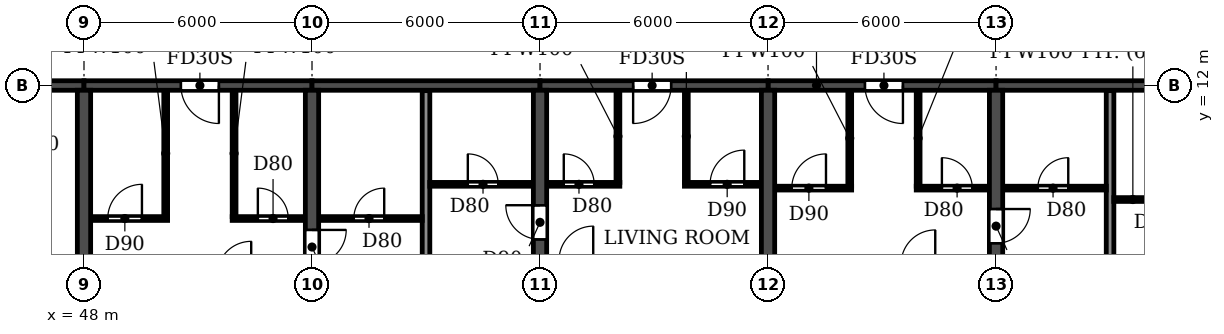
"""IFC4 building model, lengths in metres.
Left out: names, types, materials, properties, quantities, classifications, styles, units other than length and angle.
Written with IfcOpenShell. Run it as: python <this file> out.ifc"""

import sys

from ifc_helpers import new_model, si_unit, direction, frame, frame_2d, origin, place, context, subcontext, project, spatial, rectangle, extrude, element, fill, save


model = new_model("IFC4")
c1 = context("Model", 3, precision=1e-05, world=origin(), true_north=direction((0.0, 1.0)))
c2 = subcontext(c1, "Body", "Model", "MODEL_VIEW")
j1 = project(units=[si_unit("LENGTHUNIT", "METRE"), si_unit("PLANEANGLEUNIT", "RADIAN")], contexts=[c1])
p1 = place(None, origin())
s1 = spatial("IfcSite", under=j1, at=p1, CompositionType="ELEMENT")
p2 = place(p1, origin())
s2 = spatial("IfcBuilding", under=s1, at=p2, CompositionType="ELEMENT")
p3 = place(p2, frame((0.0, 0.0, 112.5)))
s3 = spatial("IfcBuildingStorey", under=s2, at=p3, CompositionType="ELEMENT", Elevation=112.5)
p4 = place(p3, frame((48.0, 0.2, 0.0), z_axis=(0.0, 0.0, 1.0), x_axis=(0.0, 1.0, 0.0)))
e1 = element("IfcWall", 1, at=p4, inside=s3, PredefinedType="SHEAR", context=c2, shape_type="SweptSolid", body=[
    extrude(rectangle(XDim=11.675, YDim=0.35, at=frame_2d((5.837, 0.0))), origin(), (0.0, 0.0, 1.0), 2.95),
])
p5 = place(p3, frame((54.0, 0.2, 0.0), z_axis=(0.0, 0.0, 1.0), x_axis=(0.0, 1.0, 0.0)))
e2 = element("IfcWall", 2, at=p5, inside=s3, PredefinedType="SHEAR", context=c2, shape_type="SweptSolid", body=[
    extrude(rectangle(XDim=11.675, YDim=0.35, at=frame_2d((5.837, 0.0))), origin(), (0.0, 0.0, 1.0), 2.95),
])
p6 = place(p5, frame((7.1, 0.0, 0.0)))
e3 = element("IfcOpeningElement", 3, at=p6, cuts=e2, PredefinedType="OPENING", context=c2, shape_type="SweptSolid", body=[
    extrude(rectangle(XDim=0.9, YDim=2.1, at=frame_2d((0.45, 1.05))), frame((0.0, 0.185, 0.0), z_axis=(0.0, -1.0, 0.0), x_axis=(1.0, 0.0, 0.0)), (0.0, 0.0, 1.0), 0.37),
])
p7 = place(p3, frame((60.0, 0.2, 0.0), z_axis=(0.0, 0.0, 1.0), x_axis=(0.0, 1.0, 0.0)))
e4 = element("IfcWall", 4, at=p7, inside=s3, PredefinedType="SHEAR", context=c2, shape_type="SweptSolid", body=[
    extrude(rectangle(XDim=11.675, YDim=0.35, at=frame_2d((5.837, 0.0))), origin(), (0.0, 0.0, 1.0), 2.95),
])
p8 = place(p7, frame((7.75, 0.0, 0.0)))
e5 = element("IfcOpeningElement", 5, at=p8, cuts=e4, PredefinedType="OPENING", context=c2, shape_type="SweptSolid", body=[
    extrude(rectangle(XDim=0.9, YDim=2.1, at=frame_2d((0.45, 1.05))), frame((0.0, 0.185, 0.0), z_axis=(0.0, -1.0, 0.0), x_axis=(1.0, 0.0, 0.0)), (0.0, 0.0, 1.0), 0.37),
])
p9 = place(p3, frame((66.0, 0.2, 0.0), z_axis=(0.0, 0.0, 1.0), x_axis=(0.0, 1.0, 0.0)))
e6 = element("IfcWall", 6, at=p9, inside=s3, PredefinedType="SHEAR", context=c2, shape_type="SweptSolid", body=[
    extrude(rectangle(XDim=11.675, YDim=0.35, at=frame_2d((5.837, 0.0))), origin(), (0.0, 0.0, 1.0), 2.95),
])
p10 = place(p3, frame((72.0, 0.2, 0.0), z_axis=(0.0, 0.0, 1.0), x_axis=(0.0, 1.0, 0.0)))
e7 = element("IfcWall", 7, at=p10, inside=s3, PredefinedType="SHEAR", context=c2, shape_type="SweptSolid", body=[
    extrude(rectangle(XDim=11.675, YDim=0.35, at=frame_2d((5.837, 0.0))), origin(), (0.0, 0.0, 1.0), 2.95),
])
p11 = place(p10, frame((7.65, 0.0, 0.0)))
e8 = element("IfcOpeningElement", 8, at=p11, cuts=e7, PredefinedType="OPENING", context=c2, shape_type="SweptSolid", body=[
    extrude(rectangle(XDim=0.9, YDim=2.1, at=frame_2d((0.45, 1.05))), frame((0.0, 0.185, 0.0), z_axis=(0.0, -1.0, 0.0), x_axis=(1.0, 0.0, 0.0)), (0.0, 0.0, 1.0), 0.37),
])
p12 = place(p3, frame((42.0, 12.0, 0.0), z_axis=(0.0, 0.0, 1.0), x_axis=(1.0, 0.0, 0.0)))
e9 = element("IfcWall", 9, at=p12, inside=s3, PredefinedType="SHEAR", context=c2, shape_type="SweptSolid", body=[
    extrude(rectangle(XDim=6.0, YDim=0.25, at=frame_2d((3.0, 0.0))), origin(), (0.0, 0.0, 1.0), 2.35),
])
p13 = place(p12, frame((2.45, 0.0, 0.0)))
e10 = element("IfcOpeningElement", 10, at=p13, cuts=e9, PredefinedType="OPENING", context=c2, shape_type="SweptSolid", body=[
    extrude(rectangle(XDim=1.0, YDim=2.1, at=frame_2d((0.5, 1.05))), frame((0.0, 0.135, 0.0), z_axis=(0.0, -1.0, 0.0), x_axis=(1.0, 0.0, 0.0)), (0.0, 0.0, 1.0), 0.27),
])
p14 = place(p3, frame((48.0, 12.0, 0.0), z_axis=(0.0, 0.0, 1.0), x_axis=(1.0, 0.0, 0.0)))
e11 = element("IfcWall", 11, at=p14, inside=s3, PredefinedType="SHEAR", context=c2, shape_type="SweptSolid", body=[
    extrude(rectangle(XDim=6.0, YDim=0.25, at=frame_2d((3.0, 0.0))), origin(), (0.0, 0.0, 1.0), 2.35),
])
p15 = place(p14, frame((2.55, 0.0, 0.0)))
e12 = element("IfcOpeningElement", 12, at=p15, cuts=e11, PredefinedType="OPENING", context=c2, shape_type="SweptSolid", body=[
    extrude(rectangle(XDim=1.0, YDim=2.1, at=frame_2d((0.5, 1.05))), frame((0.0, 0.135, 0.0), z_axis=(0.0, -1.0, 0.0), x_axis=(1.0, 0.0, 0.0)), (0.0, 0.0, 1.0), 0.27),
])
p16 = place(p3, frame((54.0, 12.0, 0.0), z_axis=(0.0, 0.0, 1.0), x_axis=(1.0, 0.0, 0.0)))
e13 = element("IfcWall", 13, at=p16, inside=s3, PredefinedType="SHEAR", context=c2, shape_type="SweptSolid", body=[
    extrude(rectangle(XDim=6.0, YDim=0.25, at=frame_2d((3.0, 0.0))), origin(), (0.0, 0.0, 1.0), 2.35),
])
p17 = place(p3, frame((60.0, 12.0, 0.0), z_axis=(0.0, 0.0, 1.0), x_axis=(1.0, 0.0, 0.0)))
e14 = element("IfcWall", 14, at=p17, inside=s3, PredefinedType="SHEAR", context=c2, shape_type="SweptSolid", body=[
    extrude(rectangle(XDim=6.0, YDim=0.25, at=frame_2d((3.0, 0.0))), origin(), (0.0, 0.0, 1.0), 2.35),
])
p18 = place(p17, frame((2.45, 0.0, 0.0)))
e15 = element("IfcOpeningElement", 15, at=p18, cuts=e14, PredefinedType="OPENING", context=c2, shape_type="SweptSolid", body=[
    extrude(rectangle(XDim=1.0, YDim=2.1, at=frame_2d((0.5, 1.05))), frame((0.0, 0.135, 0.0), z_axis=(0.0, -1.0, 0.0), x_axis=(1.0, 0.0, 0.0)), (0.0, 0.0, 1.0), 0.27),
])
p19 = place(p3, frame((66.0, 12.0, 0.0), z_axis=(0.0, 0.0, 1.0), x_axis=(1.0, 0.0, 0.0)))
e16 = element("IfcWall", 16, at=p19, inside=s3, PredefinedType="SHEAR", context=c2, shape_type="SweptSolid", body=[
    extrude(rectangle(XDim=6.0, YDim=0.25, at=frame_2d((3.0, 0.0))), origin(), (0.0, 0.0, 1.0), 2.35),
])
p20 = place(p19, frame((2.55, 0.0, 0.0)))
e17 = element("IfcOpeningElement", 17, at=p20, cuts=e16, PredefinedType="OPENING", context=c2, shape_type="SweptSolid", body=[
    extrude(rectangle(XDim=1.0, YDim=2.1, at=frame_2d((0.5, 1.05))), frame((0.0, 0.135, 0.0), z_axis=(0.0, -1.0, 0.0), x_axis=(1.0, 0.0, 0.0)), (0.0, 0.0, 1.0), 0.27),
])
p21 = place(p3, frame((72.0, 12.0, 0.0), z_axis=(0.0, 0.0, 1.0), x_axis=(1.0, 0.0, 0.0)))
e18 = element("IfcWall", 18, at=p21, inside=s3, PredefinedType="SHEAR", context=c2, shape_type="SweptSolid", body=[
    extrude(rectangle(XDim=6.0, YDim=0.25, at=frame_2d((3.0, 0.0))), origin(), (0.0, 0.0, 1.0), 2.35),
])
for number, where, z_axis, x_axis in (
    (19, (57.0, 0.06, 0.0), (0.0, 0.0, 1.0), (0.0, 1.0, 0.0)),
    (20, (75.0, 0.06, 0.0), (0.0, 0.0, 1.0), (0.0, 1.0, 0.0)),
):
    element("IfcWall", number, at=place(p3, frame(where, z_axis=z_axis, x_axis=x_axis)), inside=s3, PredefinedType="PARTITIONING", context=c2, shape_type="SweptSolid", body=[
        extrude(rectangle(XDim=11.805, YDim=0.2, at=frame_2d((5.902, 0.0))), origin(), (0.0, 0.0, 1.0), 2.95),
    ])
p22 = place(p3, frame((48.185, 8.5, 0.0), z_axis=(0.0, 0.0, 1.0), x_axis=(1.0, 0.0, 0.0)))
e21 = element("IfcWall", 21, at=p22, inside=s3, PredefinedType="PARTITIONING", context=c2, shape_type="SweptSolid", body=[
    extrude(rectangle(XDim=2.015, YDim=0.1, at=frame_2d((1.007, 0.0))), origin(), (0.0, 0.0, 1.0), 2.95),
])
p23 = place(p22, frame((0.44, 0.0, 0.0)))
e22 = element("IfcOpeningElement", 22, at=p23, cuts=e21, PredefinedType="OPENING", context=c2, shape_type="SweptSolid", body=[
    extrude(rectangle(XDim=0.9, YDim=2.1, at=frame_2d((0.45, 1.05))), frame((0.0, 0.06, 0.0), z_axis=(0.0, -1.0, 0.0), x_axis=(1.0, 0.0, 0.0)), (0.0, 0.0, 1.0), 0.12),
])
p24 = place(p3, frame((51.9, 8.5, 0.0), z_axis=(0.0, 0.0, 1.0), x_axis=(1.0, 0.0, 0.0)))
e23 = element("IfcWall", 23, at=p24, inside=s3, PredefinedType="PARTITIONING", context=c2, shape_type="SweptSolid", body=[
    extrude(rectangle(XDim=1.915, YDim=0.1, at=frame_2d((0.958, 0.0))), origin(), (0.0, 0.0, 1.0), 2.95),
])
p25 = place(p24, frame((0.675, 0.0, 0.0)))
e24 = element("IfcOpeningElement", 24, at=p25, cuts=e23, PredefinedType="OPENING", context=c2, shape_type="SweptSolid", body=[
    extrude(rectangle(XDim=0.8, YDim=2.1, at=frame_2d((0.4, 1.05))), frame((0.0, 0.06, 0.0), z_axis=(0.0, -1.0, 0.0), x_axis=(1.0, 0.0, 0.0)), (0.0, 0.0, 1.0), 0.12),
])
p26 = place(p3, frame((54.185, 8.5, 0.0), z_axis=(0.0, 0.0, 1.0), x_axis=(1.0, 0.0, 0.0)))
e25 = element("IfcWall", 25, at=p26, inside=s3, PredefinedType="PARTITIONING", context=c2, shape_type="SweptSolid", body=[
    extrude(rectangle(XDim=2.715, YDim=0.1, at=frame_2d((1.357, 0.0))), origin(), (0.0, 0.0, 1.0), 2.95),
])
p27 = place(p26, frame((0.915, 0.0, 0.0)))
e26 = element("IfcOpeningElement", 26, at=p27, cuts=e25, PredefinedType="OPENING", context=c2, shape_type="SweptSolid", body=[
    extrude(rectangle(XDim=0.8, YDim=2.1, at=frame_2d((0.4, 1.05))), frame((0.0, 0.06, 0.0), z_axis=(0.0, -1.0, 0.0), x_axis=(1.0, 0.0, 0.0)), (0.0, 0.0, 1.0), 0.12),
])
p28 = place(p3, frame((75.1, 9.0, 0.0), z_axis=(0.0, 0.0, 1.0), x_axis=(1.0, 0.0, 0.0)))
e27 = element("IfcWall", 27, at=p28, inside=s3, PredefinedType="PARTITIONING", context=c2, shape_type="SweptSolid", body=[
    extrude(rectangle(XDim=2.715, YDim=0.1, at=frame_2d((1.357, 0.0))), origin(), (0.0, 0.0, 1.0), 2.95),
])
p29 = place(p28, frame((1.0, 0.0, 0.0)))
e28 = element("IfcOpeningElement", 28, at=p29, cuts=e27, PredefinedType="OPENING", context=c2, shape_type="SweptSolid", body=[
    extrude(rectangle(XDim=0.8, YDim=2.1, at=frame_2d((0.4, 1.05))), frame((0.0, 0.06, 0.0), z_axis=(0.0, -1.0, 0.0), x_axis=(1.0, 0.0, 0.0)), (0.0, 0.0, 1.0), 0.12),
])
p30 = place(p3, frame((66.185, 9.3, 0.0), z_axis=(0.0, 0.0, 1.0), x_axis=(1.0, 0.0, 0.0)))
e29 = element("IfcWall", 29, at=p30, inside=s3, PredefinedType="PARTITIONING", context=c2, shape_type="SweptSolid", body=[
    extrude(rectangle(XDim=2.015, YDim=0.1, at=frame_2d((1.007, 0.0))), origin(), (0.0, 0.0, 1.0), 2.95),
])
p31 = place(p30, frame((0.44, 0.0, 0.0)))
e30 = element("IfcOpeningElement", 30, at=p31, cuts=e29, PredefinedType="OPENING", context=c2, shape_type="SweptSolid", body=[
    extrude(rectangle(XDim=0.9, YDim=2.1, at=frame_2d((0.45, 1.05))), frame((0.0, 0.06, 0.0), z_axis=(0.0, -1.0, 0.0), x_axis=(1.0, 0.0, 0.0)), (0.0, 0.0, 1.0), 0.12),
])
p32 = place(p3, frame((69.9, 9.3, 0.0), z_axis=(0.0, 0.0, 1.0), x_axis=(1.0, 0.0, 0.0)))
e31 = element("IfcWall", 31, at=p32, inside=s3, PredefinedType="PARTITIONING", context=c2, shape_type="SweptSolid", body=[
    extrude(rectangle(XDim=1.915, YDim=0.1, at=frame_2d((0.958, 0.0))), origin(), (0.0, 0.0, 1.0), 2.95),
])
p33 = place(p32, frame((0.675, 0.0, 0.0)))
e32 = element("IfcOpeningElement", 32, at=p33, cuts=e31, PredefinedType="OPENING", context=c2, shape_type="SweptSolid", body=[
    extrude(rectangle(XDim=0.8, YDim=2.1, at=frame_2d((0.4, 1.05))), frame((0.0, 0.06, 0.0), z_axis=(0.0, -1.0, 0.0), x_axis=(1.0, 0.0, 0.0)), (0.0, 0.0, 1.0), 0.12),
])
p34 = place(p3, frame((72.185, 9.3, 0.0), z_axis=(0.0, 0.0, 1.0), x_axis=(1.0, 0.0, 0.0)))
e33 = element("IfcWall", 33, at=p34, inside=s3, PredefinedType="PARTITIONING", context=c2, shape_type="SweptSolid", body=[
    extrude(rectangle(XDim=2.715, YDim=0.1, at=frame_2d((1.357, 0.0))), origin(), (0.0, 0.0, 1.0), 2.95),
])
p35 = place(p34, frame((0.915, 0.0, 0.0)))
e34 = element("IfcOpeningElement", 34, at=p35, cuts=e33, PredefinedType="OPENING", context=c2, shape_type="SweptSolid", body=[
    extrude(rectangle(XDim=0.8, YDim=2.1, at=frame_2d((0.4, 1.05))), frame((0.0, 0.06, 0.0), z_axis=(0.0, -1.0, 0.0), x_axis=(1.0, 0.0, 0.0)), (0.0, 0.0, 1.0), 0.12),
])
p36 = place(p3, frame((57.1, 9.4, 0.0), z_axis=(0.0, 0.0, 1.0), x_axis=(1.0, 0.0, 0.0)))
e35 = element("IfcWall", 35, at=p36, inside=s3, PredefinedType="PARTITIONING", context=c2, shape_type="SweptSolid", body=[
    extrude(rectangle(XDim=2.715, YDim=0.1, at=frame_2d((1.357, 0.0))), origin(), (0.0, 0.0, 1.0), 2.95),
])
p37 = place(p36, frame((1.0, 0.0, 0.0)))
e36 = element("IfcOpeningElement", 36, at=p37, cuts=e35, PredefinedType="OPENING", context=c2, shape_type="SweptSolid", body=[
    extrude(rectangle(XDim=0.8, YDim=2.1, at=frame_2d((0.4, 1.05))), frame((0.0, 0.06, 0.0), z_axis=(0.0, -1.0, 0.0), x_axis=(1.0, 0.0, 0.0)), (0.0, 0.0, 1.0), 0.12),
])
p38 = place(p3, frame((60.185, 9.4, 0.0), z_axis=(0.0, 0.0, 1.0), x_axis=(1.0, 0.0, 0.0)))
e37 = element("IfcWall", 37, at=p38, inside=s3, PredefinedType="PARTITIONING", context=c2, shape_type="SweptSolid", body=[
    extrude(rectangle(XDim=1.915, YDim=0.1, at=frame_2d((0.958, 0.0))), origin(), (0.0, 0.0, 1.0), 2.95),
])
p39 = place(p38, frame((0.44, 0.0, 0.0)))
e38 = element("IfcOpeningElement", 38, at=p39, cuts=e37, PredefinedType="OPENING", context=c2, shape_type="SweptSolid", body=[
    extrude(rectangle(XDim=0.8, YDim=2.1, at=frame_2d((0.4, 1.05))), frame((0.0, 0.06, 0.0), z_axis=(0.0, -1.0, 0.0), x_axis=(1.0, 0.0, 0.0)), (0.0, 0.0, 1.0), 0.12),
])
p40 = place(p3, frame((63.8, 9.4, 0.0), z_axis=(0.0, 0.0, 1.0), x_axis=(1.0, 0.0, 0.0)))
e39 = element("IfcWall", 39, at=p40, inside=s3, PredefinedType="PARTITIONING", context=c2, shape_type="SweptSolid", body=[
    extrude(rectangle(XDim=2.015, YDim=0.1, at=frame_2d((1.007, 0.0))), origin(), (0.0, 0.0, 1.0), 2.95),
])
p41 = place(p40, frame((0.675, 0.0, 0.0)))
e40 = element("IfcOpeningElement", 40, at=p41, cuts=e39, PredefinedType="OPENING", context=c2, shape_type="SweptSolid", body=[
    extrude(rectangle(XDim=0.9, YDim=2.1, at=frame_2d((0.45, 1.05))), frame((0.0, 0.06, 0.0), z_axis=(0.0, -1.0, 0.0), x_axis=(1.0, 0.0, 0.0)), (0.0, 0.0, 1.0), 0.12),
])
for number, where, z_axis, x_axis in (
    (41, (50.15, 8.55, 0.0), (0.0, 0.0, 1.0), (0.0, 1.0, 0.0)),
    (42, (51.95, 8.55, 0.0), (0.0, 0.0, 1.0), (0.0, 1.0, 0.0)),
):
    element("IfcWall", number, at=place(p3, frame(where, z_axis=z_axis, x_axis=x_axis)), inside=s3, PredefinedType="PARTITIONING", context=c2, shape_type="SweptSolid", body=[
        extrude(rectangle(XDim=3.315, YDim=0.1, at=frame_2d((1.657, 0.0))), origin(), (0.0, 0.0, 1.0), 2.95),
    ])
for number, where, z_axis, x_axis in (
    (43, (62.05, 9.45, 0.0), (0.0, 0.0, 1.0), (0.0, 1.0, 0.0)),
    (44, (63.85, 9.45, 0.0), (0.0, 0.0, 1.0), (0.0, 1.0, 0.0)),
):
    element("IfcWall", number, at=place(p3, frame(where, z_axis=z_axis, x_axis=x_axis)), inside=s3, PredefinedType="PARTITIONING", context=c2, shape_type="SweptSolid", body=[
        extrude(rectangle(XDim=2.415, YDim=0.1, at=frame_2d((1.208, 0.0))), origin(), (0.0, 0.0, 1.0), 2.95),
    ])
for number, where, z_axis, x_axis in (
    (45, (68.15, 9.35, 0.0), (0.0, 0.0, 1.0), (0.0, 1.0, 0.0)),
    (46, (69.95, 9.35, 0.0), (0.0, 0.0, 1.0), (0.0, 1.0, 0.0)),
):
    element("IfcWall", number, at=place(p3, frame(where, z_axis=z_axis, x_axis=x_axis)), inside=s3, PredefinedType="PARTITIONING", context=c2, shape_type="SweptSolid", body=[
        extrude(rectangle(XDim=2.515, YDim=0.1, at=frame_2d((1.257, 0.0))), origin(), (0.0, 0.0, 1.0), 2.95),
    ])
p42 = place(p27, origin())
e47 = element("IfcDoor", 47, at=p42, inside=s3, OperationType="SINGLE_SWING_RIGHT", PredefinedType="DOOR", context=c2, shape_type="SweptSolid", body=[
    extrude(rectangle(XDim=0.8, YDim=2.1, at=frame_2d((0.4, 1.05))), frame((0.0, 0.025, 0.0), z_axis=(0.0, -1.0, 0.0), x_axis=(1.0, 0.0, 0.0)), (0.0, 0.0, 1.0), 0.05),
])
fill(e26, e47)
p43 = place(p23, origin())
e48 = element("IfcDoor", 48, at=p43, inside=s3, OperationType="SINGLE_SWING_RIGHT", PredefinedType="DOOR", context=c2, shape_type="SweptSolid", body=[
    extrude(rectangle(XDim=0.9, YDim=2.1, at=frame_2d((0.45, 1.05))), frame((0.0, 0.025, 0.0), z_axis=(0.0, -1.0, 0.0), x_axis=(1.0, 0.0, 0.0)), (0.0, 0.0, 1.0), 0.05),
])
fill(e22, e48)
p44 = place(p15, frame((1.0, 0.0, 0.0), z_axis=(0.0, 0.0, 1.0), x_axis=(-1.0, 0.0, 0.0)))
e49 = element("IfcDoor", 49, at=p44, inside=s3, OperationType="SINGLE_SWING_LEFT", PredefinedType="DOOR", context=c2, shape_type="SweptSolid", body=[
    extrude(rectangle(XDim=1.0, YDim=2.1, at=frame_2d((0.5, 1.05))), frame((0.0, 0.025, 0.0), z_axis=(0.0, -1.0, 0.0), x_axis=(1.0, 0.0, 0.0)), (0.0, 0.0, 1.0), 0.05),
])
fill(e12, e49)
p45 = place(p25, origin())
e50 = element("IfcDoor", 50, at=p45, inside=s3, OperationType="SINGLE_SWING_LEFT", PredefinedType="DOOR", context=c2, shape_type="SweptSolid", body=[
    extrude(rectangle(XDim=0.8, YDim=2.1, at=frame_2d((0.4, 1.05))), frame((0.0, 0.025, 0.0), z_axis=(0.0, -1.0, 0.0), x_axis=(1.0, 0.0, 0.0)), (0.0, 0.0, 1.0), 0.05),
])
fill(e24, e50)
p46 = place(p6, frame((0.9, 0.0, 0.0), z_axis=(0.0, 0.0, 1.0), x_axis=(-1.0, 0.0, 0.0)))
e51 = element("IfcDoor", 51, at=p46, inside=s3, OperationType="SINGLE_SWING_LEFT", PredefinedType="DOOR", context=c2, shape_type="SweptSolid", body=[
    extrude(rectangle(XDim=0.9, YDim=2.1, at=frame_2d((0.45, 1.05))), frame((0.0, 0.025, 0.0), z_axis=(0.0, -1.0, 0.0), x_axis=(1.0, 0.0, 0.0)), (0.0, 0.0, 1.0), 0.05),
])
fill(e3, e51)
p47 = place(p37, origin())
e52 = element("IfcDoor", 52, at=p47, inside=s3, OperationType="SINGLE_SWING_LEFT", PredefinedType="DOOR", context=c2, shape_type="SweptSolid", body=[
    extrude(rectangle(XDim=0.8, YDim=2.1, at=frame_2d((0.4, 1.05))), frame((0.0, 0.025, 0.0), z_axis=(0.0, -1.0, 0.0), x_axis=(1.0, 0.0, 0.0)), (0.0, 0.0, 1.0), 0.05),
])
fill(e36, e52)
p48 = place(p8, origin())
e53 = element("IfcDoor", 53, at=p48, inside=s3, OperationType="SINGLE_SWING_RIGHT", PredefinedType="DOOR", context=c2, shape_type="SweptSolid", body=[
    extrude(rectangle(XDim=0.9, YDim=2.1, at=frame_2d((0.45, 1.05))), frame((0.0, 0.025, 0.0), z_axis=(0.0, -1.0, 0.0), x_axis=(1.0, 0.0, 0.0)), (0.0, 0.0, 1.0), 0.05),
])
fill(e5, e53)
p49 = place(p39, origin())
e54 = element("IfcDoor", 54, at=p49, inside=s3, OperationType="SINGLE_SWING_LEFT", PredefinedType="DOOR", context=c2, shape_type="SweptSolid", body=[
    extrude(rectangle(XDim=0.8, YDim=2.1, at=frame_2d((0.4, 1.05))), frame((0.0, 0.025, 0.0), z_axis=(0.0, -1.0, 0.0), x_axis=(1.0, 0.0, 0.0)), (0.0, 0.0, 1.0), 0.05),
])
fill(e38, e54)
p50 = place(p18, frame((1.0, 0.0, 0.0), z_axis=(0.0, 0.0, 1.0), x_axis=(-1.0, 0.0, 0.0)))
e55 = element("IfcDoor", 55, at=p50, inside=s3, OperationType="SINGLE_SWING_RIGHT", PredefinedType="DOOR", context=c2, shape_type="SweptSolid", body=[
    extrude(rectangle(XDim=1.0, YDim=2.1, at=frame_2d((0.5, 1.05))), frame((0.0, 0.025, 0.0), z_axis=(0.0, -1.0, 0.0), x_axis=(1.0, 0.0, 0.0)), (0.0, 0.0, 1.0), 0.05),
])
fill(e15, e55)
p51 = place(p41, origin())
e56 = element("IfcDoor", 56, at=p51, inside=s3, OperationType="SINGLE_SWING_RIGHT", PredefinedType="DOOR", context=c2, shape_type="SweptSolid", body=[
    extrude(rectangle(XDim=0.9, YDim=2.1, at=frame_2d((0.45, 1.05))), frame((0.0, 0.025, 0.0), z_axis=(0.0, -1.0, 0.0), x_axis=(1.0, 0.0, 0.0)), (0.0, 0.0, 1.0), 0.05),
])
fill(e40, e56)
p52 = place(p35, origin())
e57 = element("IfcDoor", 57, at=p52, inside=s3, OperationType="SINGLE_SWING_RIGHT", PredefinedType="DOOR", context=c2, shape_type="SweptSolid", body=[
    extrude(rectangle(XDim=0.8, YDim=2.1, at=frame_2d((0.4, 1.05))), frame((0.0, 0.025, 0.0), z_axis=(0.0, -1.0, 0.0), x_axis=(1.0, 0.0, 0.0)), (0.0, 0.0, 1.0), 0.05),
])
fill(e34, e57)
p53 = place(p31, origin())
e58 = element("IfcDoor", 58, at=p53, inside=s3, OperationType="SINGLE_SWING_RIGHT", PredefinedType="DOOR", context=c2, shape_type="SweptSolid", body=[
    extrude(rectangle(XDim=0.9, YDim=2.1, at=frame_2d((0.45, 1.05))), frame((0.0, 0.025, 0.0), z_axis=(0.0, -1.0, 0.0), x_axis=(1.0, 0.0, 0.0)), (0.0, 0.0, 1.0), 0.05),
])
fill(e30, e58)
p54 = place(p20, frame((1.0, 0.0, 0.0), z_axis=(0.0, 0.0, 1.0), x_axis=(-1.0, 0.0, 0.0)))
e59 = element("IfcDoor", 59, at=p54, inside=s3, OperationType="SINGLE_SWING_LEFT", PredefinedType="DOOR", context=c2, shape_type="SweptSolid", body=[
    extrude(rectangle(XDim=1.0, YDim=2.1, at=frame_2d((0.5, 1.05))), frame((0.0, 0.025, 0.0), z_axis=(0.0, -1.0, 0.0), x_axis=(1.0, 0.0, 0.0)), (0.0, 0.0, 1.0), 0.05),
])
fill(e17, e59)
p55 = place(p33, origin())
e60 = element("IfcDoor", 60, at=p55, inside=s3, OperationType="SINGLE_SWING_LEFT", PredefinedType="DOOR", context=c2, shape_type="SweptSolid", body=[
    extrude(rectangle(XDim=0.8, YDim=2.1, at=frame_2d((0.4, 1.05))), frame((0.0, 0.025, 0.0), z_axis=(0.0, -1.0, 0.0), x_axis=(1.0, 0.0, 0.0)), (0.0, 0.0, 1.0), 0.05),
])
fill(e32, e60)
p56 = place(p11, frame((0.9, 0.0, 0.0), z_axis=(0.0, 0.0, 1.0), x_axis=(-1.0, 0.0, 0.0)))
e61 = element("IfcDoor", 61, at=p56, inside=s3, OperationType="SINGLE_SWING_LEFT", PredefinedType="DOOR", context=c2, shape_type="SweptSolid", body=[
    extrude(rectangle(XDim=0.9, YDim=2.1, at=frame_2d((0.45, 1.05))), frame((0.0, 0.025, 0.0), z_axis=(0.0, -1.0, 0.0), x_axis=(1.0, 0.0, 0.0)), (0.0, 0.0, 1.0), 0.05),
])
fill(e8, e61)
save(model, sys.argv[1])
